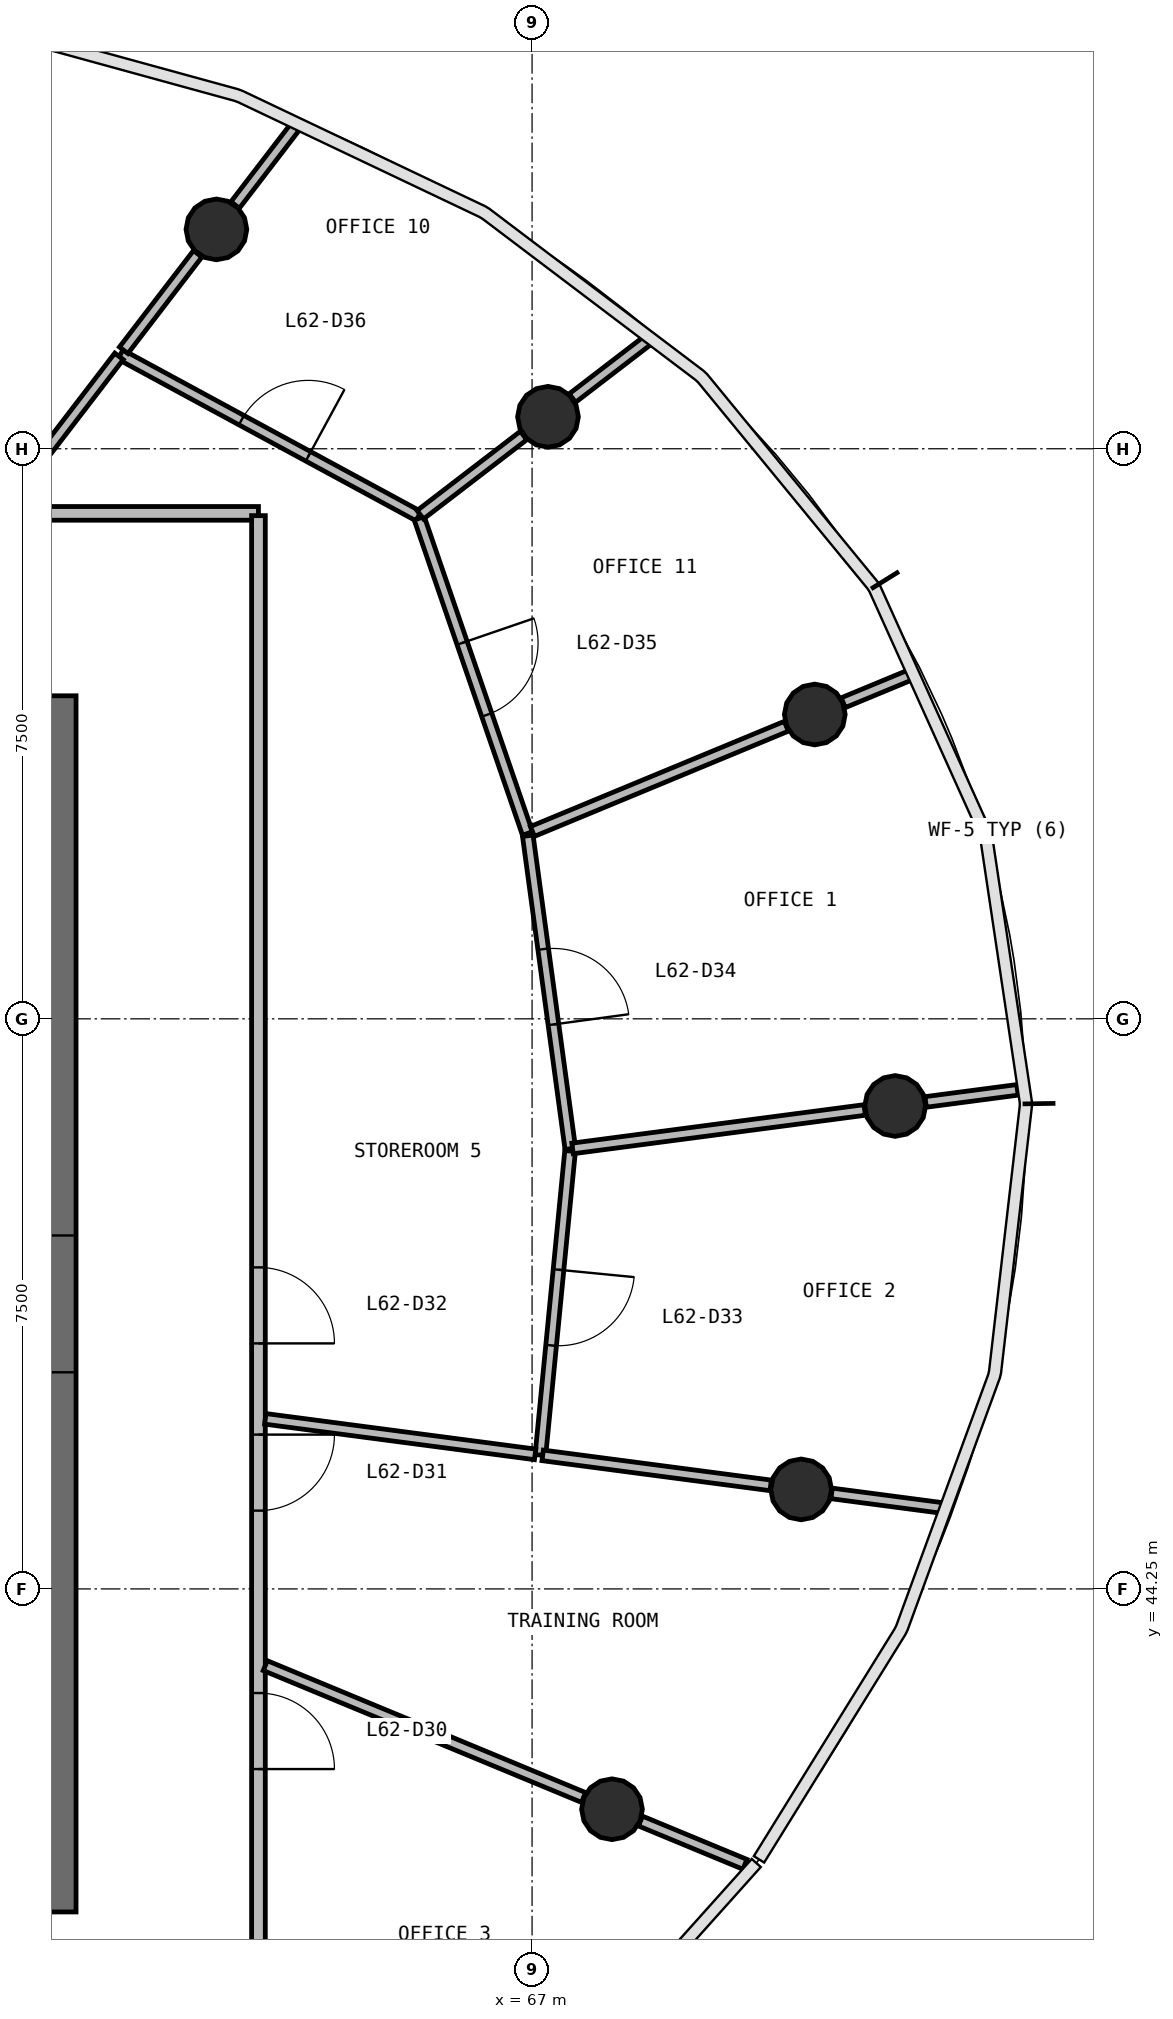
"""IFC4 building model, lengths in metres.
Left out: names, types, materials, properties, quantities, classifications, styles, units other than length and angle.
Written with IfcOpenShell. Run it as: python <this file> out.ifc"""

import sys

from ifc_helpers import new_model, si_unit, direction, frame, frame_2d, origin, origin_2d, place, context, subcontext, project, spatial, rectangle, circle, extrude, source, transform, mapped, element, fill, save


model = new_model("IFC4")
c1 = context("Model", 3, precision=1e-05, world=origin(), true_north=direction((0.0, 1.0)))
c2 = subcontext(c1, "Body", "Model", "MODEL_VIEW")
j1 = project(units=[si_unit("LENGTHUNIT", "METRE"), si_unit("PLANEANGLEUNIT", "RADIAN")], contexts=[c1])
p1 = place(None, origin())
s1 = spatial("IfcSite", under=j1, at=p1, CompositionType="ELEMENT")
p2 = place(p1, origin())
s2 = spatial("IfcBuilding", under=s1, at=p2, CompositionType="ELEMENT")
p3 = place(p2, frame((0.0, 0.0, 254.0)))
s3 = spatial("IfcBuildingStorey", under=s2, at=p3, CompositionType="ELEMENT", Elevation=254.0)
p4 = place(p3, frame((60.7, 40.0, 0.0), z_axis=(0.0, 0.0, 1.0), x_axis=(0.0, 1.0, 0.0)))
e1 = element("IfcWall", 1, at=p4, inside=s3, PredefinedType="SHEAR", context=c2, shape_type="SweptSolid", body=[
    extrude(rectangle(XDim=16.0, YDim=0.6, at=frame_2d((8.0, 0.0))), origin(), (0.0, 0.0, 1.0), 3.9),
])
p5 = place(p4, frame((7.1, 0.0, 0.0)))
e2 = element("IfcOpeningElement", 2, at=p5, cuts=e1, PredefinedType="OPENING", context=c2, shape_type="SweptSolid", body=[
    extrude(rectangle(XDim=1.8, YDim=2.1, at=frame_2d((0.9, 1.05))), frame((0.0, 0.31, 0.0), z_axis=(0.0, -1.0, 0.0), x_axis=(1.0, 0.0, 0.0)), (0.0, 0.0, 1.0), 0.62),
])
m1 = source(origin(), c2, "Body", "SweptSolid", [
    extrude(circle(Radius=0.4, at=origin_2d()), origin(), (0.0, 0.0, 1.0), 3.9),
])
for number, where, z_axis, x_axis in (
    (3, (71.777, 50.604, 0.0), (0.0, 0.0, 1.0), (1.0, 0.0, 0.0)),
    (4, (70.719, 55.754, 0.0), (0.0, 0.0, 1.0), (1.0, 0.0, 0.0)),
    (5, (67.209, 59.671, 0.0), (0.0, 0.0, 1.0), (1.0, 0.0, 0.0)),
    (6, (62.847, 62.136, 0.0), (0.0, 0.0, 1.0), (1.0, 0.0, 0.0)),
    (7, (68.052, 41.351, 0.0), (0.0, 0.0, 1.0), (1.0, 0.0, 0.0)),
    (8, (70.54, 45.559, 0.0), (0.0, 0.0, 1.0), (1.0, 0.0, 0.0)),
):
    element("IfcColumn", number, at=place(p3, frame(where, z_axis=z_axis, x_axis=x_axis)), inside=s3, PredefinedType="COLUMN", context=c2, shape_type="MappedRepresentation", body=[
        mapped(m1, transform((0.0, 0.0, 0.0), scale=1.0)),
    ])
p6 = place(p3, frame((40.6, 58.4, 0.0), z_axis=(0.0, 0.0, 1.0), x_axis=(1.0, 0.0, 0.0)))
e9 = element("IfcWall", 9, at=p6, inside=s3, PredefinedType="PARTITIONING", context=c2, shape_type="SweptSolid", body=[
    extrude(rectangle(XDim=22.8, YDim=0.18, at=frame_2d((11.4, 0.0))), origin(), (0.0, 0.0, 1.0), 2.88),
])
p7 = place(p6, frame((16.15, 0.0, 0.0)))
e10 = element("IfcOpeningElement", 10, at=p7, cuts=e9, PredefinedType="OPENING", context=c2, shape_type="SweptSolid", body=[
    extrude(rectangle(XDim=1.0, YDim=2.1, at=frame_2d((0.5, 1.05))), frame((0.0, 0.1, 0.0), z_axis=(0.0, -1.0, 0.0), x_axis=(1.0, 0.0, 0.0)), (0.0, 0.0, 1.0), 0.2),
])
p8 = place(p6, frame((10.95, 0.0, 0.0)))
e11 = element("IfcOpeningElement", 11, at=p8, cuts=e9, PredefinedType="OPENING", context=c2, shape_type="SweptSolid", body=[
    extrude(rectangle(XDim=1.0, YDim=2.1, at=frame_2d((0.5, 1.05))), frame((0.0, 0.1, 0.0), z_axis=(0.0, -1.0, 0.0), x_axis=(1.0, 0.0, 0.0)), (0.0, 0.0, 1.0), 0.2),
])
p9 = place(p6, frame((8.75, 0.0, 0.0)))
e12 = element("IfcOpeningElement", 12, at=p9, cuts=e9, PredefinedType="OPENING", context=c2, shape_type="SweptSolid", body=[
    extrude(rectangle(XDim=1.0, YDim=2.1, at=frame_2d((0.5, 1.05))), frame((0.0, 0.1, 0.0), z_axis=(0.0, -1.0, 0.0), x_axis=(1.0, 0.0, 0.0)), (0.0, 0.0, 1.0), 0.2),
])
p10 = place(p6, frame((5.75, 0.0, 0.0)))
e13 = element("IfcOpeningElement", 13, at=p10, cuts=e9, PredefinedType="OPENING", context=c2, shape_type="SweptSolid", body=[
    extrude(rectangle(XDim=1.0, YDim=2.1, at=frame_2d((0.5, 1.05))), frame((0.0, 0.1, 0.0), z_axis=(0.0, -1.0, 0.0), x_axis=(1.0, 0.0, 0.0)), (0.0, 0.0, 1.0), 0.2),
])
p11 = place(p3, frame((63.4, 58.37, 0.0), z_axis=(0.0, 0.0, 1.0), x_axis=(0.0, -1.0, 0.0)))
e14 = element("IfcWall", 14, at=p11, inside=s3, PredefinedType="PARTITIONING", context=c2, shape_type="SweptSolid", body=[
    extrude(rectangle(XDim=20.74, YDim=0.18, at=frame_2d((10.37, 0.0))), origin(), (0.0, 0.0, 1.0), 2.88),
])
p12 = place(p11, frame((15.49, 0.0, 0.0)))
e15 = element("IfcOpeningElement", 15, at=p12, cuts=e14, PredefinedType="OPENING", context=c2, shape_type="SweptSolid", body=[
    extrude(rectangle(XDim=1.0, YDim=2.1, at=frame_2d((0.5, 1.05))), frame((0.0, 0.1, 0.0), z_axis=(0.0, -1.0, 0.0), x_axis=(1.0, 0.0, 0.0)), (0.0, 0.0, 1.0), 0.2),
])
p13 = place(p11, frame((12.09, 0.0, 0.0)))
e16 = element("IfcOpeningElement", 16, at=p13, cuts=e14, PredefinedType="OPENING", context=c2, shape_type="SweptSolid", body=[
    extrude(rectangle(XDim=1.0, YDim=2.1, at=frame_2d((0.5, 1.05))), frame((0.0, 0.1, 0.0), z_axis=(0.0, -1.0, 0.0), x_axis=(1.0, 0.0, 0.0)), (0.0, 0.0, 1.0), 0.2),
])
p14 = place(p11, frame((9.89, 0.0, 0.0)))
e17 = element("IfcOpeningElement", 17, at=p14, cuts=e14, PredefinedType="OPENING", context=c2, shape_type="SweptSolid", body=[
    extrude(rectangle(XDim=1.0, YDim=2.1, at=frame_2d((0.5, 1.05))), frame((0.0, 0.1, 0.0), z_axis=(0.0, -1.0, 0.0), x_axis=(1.0, 0.0, 0.0)), (0.0, 0.0, 1.0), 0.2),
])
p15 = place(p3, frame((63.49, 43.241, 0.0), z_axis=(0.0, 0.0, 1.0), x_axis=(0.923863854318, -0.382721280679, 0.0)))
e18 = element("IfcWall", 18, at=p15, inside=s3, PredefinedType="PARTITIONING", context=c2, shape_type="SweptSolid", body=[
    extrude(rectangle(XDim=4.532, YDim=0.14, at=frame_2d((2.266, 0.0))), origin(), (0.0, 0.0, 1.0), 2.88),
])
p16 = place(p3, frame((61.584, 60.49, 0.0), z_axis=(0.0, 0.0, 1.0), x_axis=(0.879105698322, -0.476626867873, 0.0)))
e19 = element("IfcWall", 19, at=p16, inside=s3, PredefinedType="PARTITIONING", context=c2, shape_type="SweptSolid", body=[
    extrude(rectangle(XDim=4.461, YDim=0.14, at=frame_2d((2.231, 0.0))), origin(), (0.0, 0.0, 1.0), 2.88),
])
p17 = place(p16, frame((1.812, 0.0, 0.0)))
e20 = element("IfcOpeningElement", 20, at=p17, cuts=e19, PredefinedType="OPENING", context=c2, shape_type="SweptSolid", body=[
    extrude(rectangle(XDim=1.0, YDim=2.1, at=frame_2d((0.5, 1.05))), frame((0.0, 0.08, 0.0), z_axis=(0.0, -1.0, 0.0), x_axis=(1.0, 0.0, 0.0)), (0.0, 0.0, 1.0), 0.16),
])
p18 = place(p3, frame((65.516, 58.335, 0.0), z_axis=(0.0, 0.0, 1.0), x_axis=(0.324784086982, -0.94578818815, 0.0)))
e21 = element("IfcWall", 21, at=p18, inside=s3, PredefinedType="PARTITIONING", context=c2, shape_type="SweptSolid", body=[
    extrude(rectangle(XDim=4.385, YDim=0.14, at=frame_2d((2.192, 0.0))), origin(), (0.0, 0.0, 1.0), 2.88),
])
p19 = place(p18, frame((1.735, 0.0, 0.0)))
e22 = element("IfcOpeningElement", 22, at=p19, cuts=e21, PredefinedType="OPENING", context=c2, shape_type="SweptSolid", body=[
    extrude(rectangle(XDim=1.0, YDim=2.1, at=frame_2d((0.5, 1.05))), frame((0.0, 0.08, 0.0), z_axis=(0.0, -1.0, 0.0), x_axis=(1.0, 0.0, 0.0)), (0.0, 0.0, 1.0), 0.16),
])
p20 = place(p3, frame((66.944, 54.158, 0.0), z_axis=(0.0, 0.0, 1.0), x_axis=(0.134607157265, -0.990899042896, 0.0)))
e23 = element("IfcWall", 23, at=p20, inside=s3, PredefinedType="PARTITIONING", context=c2, shape_type="SweptSolid", body=[
    extrude(rectangle(XDim=4.155, YDim=0.14, at=frame_2d((2.078, 0.0))), origin(), (0.0, 0.0, 1.0), 2.88),
])
p21 = place(p20, frame((1.505, 0.0, 0.0)))
e24 = element("IfcOpeningElement", 24, at=p21, cuts=e23, PredefinedType="OPENING", context=c2, shape_type="SweptSolid", body=[
    extrude(rectangle(XDim=1.0, YDim=2.1, at=frame_2d((0.5, 1.05))), frame((0.0, 0.08, 0.0), z_axis=(0.0, -1.0, 0.0), x_axis=(1.0, 0.0, 0.0)), (0.0, 0.0, 1.0), 0.16),
])
p22 = place(p3, frame((67.5, 50.011, 0.0), z_axis=(0.0, 0.0, 1.0), x_axis=(-0.097182142136, -0.995266613149, 0.0)))
e25 = element("IfcWall", 25, at=p22, inside=s3, PredefinedType="PARTITIONING", context=c2, shape_type="SweptSolid", body=[
    extrude(rectangle(XDim=4.02, YDim=0.14, at=frame_2d((2.01, 0.0))), origin(), (0.0, 0.0, 1.0), 2.88),
])
p23 = place(p22, frame((1.57, 0.0, 0.0)))
e26 = element("IfcOpeningElement", 26, at=p23, cuts=e25, PredefinedType="OPENING", context=c2, shape_type="SweptSolid", body=[
    extrude(rectangle(XDim=1.0, YDim=2.1, at=frame_2d((0.5, 1.05))), frame((0.0, 0.08, 0.0), z_axis=(0.0, -1.0, 0.0), x_axis=(1.0, 0.0, 0.0)), (0.0, 0.0, 1.0), 0.16),
])
p24 = place(p3, frame((67.533, 50.045, 0.0), z_axis=(0.0, 0.0, 1.0), x_axis=(0.991448721088, 0.130496871433, 0.0)))
e27 = element("IfcWall", 27, at=p24, inside=s3, PredefinedType="PARTITIONING", context=c2, shape_type="SweptSolid", body=[
    extrude(rectangle(XDim=3.876, YDim=0.14, at=frame_2d((1.938, 0.0))), origin(), (0.0, 0.0, 1.0), 2.88),
])
p25 = place(p3, frame((63.49, 46.487, 0.0), z_axis=(0.0, 0.0, 1.0), x_axis=(0.991449189531, -0.130493312389, 0.0)))
e28 = element("IfcWall", 28, at=p25, inside=s3, PredefinedType="PARTITIONING", context=c2, shape_type="SweptSolid", body=[
    extrude(rectangle(XDim=3.581, YDim=0.14, at=frame_2d((1.791, 0.0))), origin(), (0.0, 0.0, 1.0), 2.88),
])
p26 = place(p3, frame((67.005, 54.215, 0.0), z_axis=(0.0, 0.0, 1.0), x_axis=(0.923881881036, 0.382677762475, 0.0)))
e29 = element("IfcWall", 29, at=p26, inside=s3, PredefinedType="PARTITIONING", context=c2, shape_type="SweptSolid", body=[
    extrude(rectangle(XDim=3.616, YDim=0.14, at=frame_2d((1.808, 0.0))), origin(), (0.0, 0.0, 1.0), 2.88),
])
p27 = place(p3, frame((67.139, 46.007, 0.0), z_axis=(0.0, 0.0, 1.0), x_axis=(0.991449900288, -0.130487912157, 0.0)))
e30 = element("IfcWall", 30, at=p27, inside=s3, PredefinedType="PARTITIONING", context=c2, shape_type="SweptSolid", body=[
    extrude(rectangle(XDim=3.025, YDim=0.14, at=frame_2d((1.513, 0.0))), origin(), (0.0, 0.0, 1.0), 2.88),
])
p28 = place(p3, frame((60.049, 58.49, 0.0), z_axis=(0.0, 0.0, 1.0), x_axis=(0.608762828767, 0.793352266217, 0.0)))
e31 = element("IfcWall", 31, at=p28, inside=s3, PredefinedType="PARTITIONING", context=c2, shape_type="SweptSolid", body=[
    extrude(rectangle(XDim=2.49, YDim=0.14, at=frame_2d((1.245, 0.0))), origin(), (0.0, 0.0, 1.0), 2.88),
])
p29 = place(p3, frame((65.53, 58.382, 0.0), z_axis=(0.0, 0.0, 1.0), x_axis=(0.793349348646, 0.608766630986, 0.0)))
e32 = element("IfcWall", 32, at=p29, inside=s3, PredefinedType="PARTITIONING", context=c2, shape_type="SweptSolid", body=[
    extrude(rectangle(XDim=1.713, YDim=0.14, at=frame_2d((0.856, 0.0))), origin(), (0.0, 0.0, 1.0), 2.88),
])
p30 = place(p3, frame((61.627, 60.546, 0.0), z_axis=(0.0, 0.0, 1.0), x_axis=(0.608803148953, 0.79332132571, 0.0)))
e33 = element("IfcWall", 33, at=p30, inside=s3, PredefinedType="PARTITIONING", context=c2, shape_type="SweptSolid", body=[
    extrude(rectangle(XDim=1.6, YDim=0.14, at=frame_2d((0.8, 0.0))), origin(), (0.0, 0.0, 1.0), 2.88),
])
p31 = place(p3, frame((70.941, 45.506, 0.0), z_axis=(0.0, 0.0, 1.0), x_axis=(0.991445430329, -0.130521870506, 0.0)))
e34 = element("IfcWall", 34, at=p31, inside=s3, PredefinedType="PARTITIONING", context=c2, shape_type="SweptSolid", body=[
    extrude(rectangle(XDim=1.5, YDim=0.14, at=frame_2d((0.75, 0.0))), origin(), (0.0, 0.0, 1.0), 2.88),
])
p32 = place(p3, frame((68.426, 41.196, 0.0), z_axis=(0.0, 0.0, 1.0), x_axis=(0.923870878191, -0.382704325074, 0.0)))
e35 = element("IfcWall", 35, at=p32, inside=s3, PredefinedType="PARTITIONING", context=c2, shape_type="SweptSolid", body=[
    extrude(rectangle(XDim=1.488, YDim=0.14, at=frame_2d((0.744, 0.0))), origin(), (0.0, 0.0, 1.0), 2.88),
])
p33 = place(p3, frame((63.093, 62.457, 0.0), z_axis=(0.0, 0.0, 1.0), x_axis=(0.608700288014, 0.793400251683, 0.0)))
e36 = element("IfcWall", 36, at=p33, inside=s3, PredefinedType="PARTITIONING", context=c2, shape_type="SweptSolid", body=[
    extrude(rectangle(XDim=1.297, YDim=0.14, at=frame_2d((0.648, 0.0))), origin(), (0.0, 0.0, 1.0), 2.88),
])
p34 = place(p3, frame((67.531, 59.917, 0.0), z_axis=(0.0, 0.0, 1.0), x_axis=(0.793361818833, 0.608750379399, 0.0)))
e37 = element("IfcWall", 37, at=p34, inside=s3, PredefinedType="PARTITIONING", context=c2, shape_type="SweptSolid", body=[
    extrude(rectangle(XDim=1.254, YDim=0.14, at=frame_2d((0.627, 0.0))), origin(), (0.0, 0.0, 1.0), 2.88),
])
p35 = place(p3, frame((72.178, 50.656, 0.0), z_axis=(0.0, 0.0, 1.0), x_axis=(0.991448836413, 0.13049599525, 0.0)))
e38 = element("IfcWall", 38, at=p35, inside=s3, PredefinedType="PARTITIONING", context=c2, shape_type="SweptSolid", body=[
    extrude(rectangle(XDim=1.218, YDim=0.14, at=frame_2d((0.609, 0.0))), origin(), (0.0, 0.0, 1.0), 2.88),
])
p36 = place(p3, frame((71.094, 55.909, 0.0), z_axis=(0.0, 0.0, 1.0), x_axis=(0.923864621618, 0.382719428462, 0.0)))
e39 = element("IfcWall", 39, at=p36, inside=s3, PredefinedType="PARTITIONING", context=c2, shape_type="SweptSolid", body=[
    extrude(rectangle(XDim=0.997, YDim=0.14, at=frame_2d((0.499, 0.0))), origin(), (0.0, 0.0, 1.0), 2.88),
])
m2 = source(origin(), c2, "Body", "SweptSolid", [
    extrude(rectangle(XDim=1.8, YDim=2.1, at=frame_2d((0.9, 1.05))), frame((0.0, 0.025, 0.0), z_axis=(0.0, -1.0, 0.0), x_axis=(1.0, 0.0, 0.0)), (0.0, 0.0, 1.0), 0.05),
])
p37 = place(p5, origin())
e40 = element("IfcDoor", 40, at=p37, inside=s3, OperationType="SINGLE_SWING_LEFT", PredefinedType="DOOR", context=c2, shape_type="MappedRepresentation", body=[
    mapped(m2, transform((0.0, 0.0, 0.0), scale=1.0)),
])
fill(e2, e40)
m3 = source(origin(), c2, "Body", "SweptSolid", [
    extrude(rectangle(XDim=1.0, YDim=2.1, at=frame_2d((0.5, 1.05))), frame((0.0, 0.025, 0.0), z_axis=(0.0, -1.0, 0.0), x_axis=(1.0, 0.0, 0.0)), (0.0, 0.0, 1.0), 0.05),
])
p38 = place(p12, origin())
e41 = element("IfcDoor", 41, at=p38, inside=s3, OperationType="SINGLE_SWING_RIGHT", PredefinedType="DOOR", context=c2, shape_type="MappedRepresentation", body=[
    mapped(m3, transform((0.0, 0.0, 0.0), scale=1.0)),
])
fill(e15, e41)
p39 = place(p13, origin())
e42 = element("IfcDoor", 42, at=p39, inside=s3, OperationType="SINGLE_SWING_LEFT", PredefinedType="DOOR", context=c2, shape_type="MappedRepresentation", body=[
    mapped(m3, transform((0.0, 0.0, 0.0), scale=1.0)),
])
fill(e16, e42)
p40 = place(p14, origin())
e43 = element("IfcDoor", 43, at=p40, inside=s3, OperationType="SINGLE_SWING_RIGHT", PredefinedType="DOOR", context=c2, shape_type="MappedRepresentation", body=[
    mapped(m3, transform((0.0, 0.0, 0.0), scale=1.0)),
])
fill(e17, e43)
p41 = place(p23, origin())
e44 = element("IfcDoor", 44, at=p41, inside=s3, OperationType="SINGLE_SWING_LEFT", PredefinedType="DOOR", context=c2, shape_type="MappedRepresentation", body=[
    mapped(m3, transform((0.0, 0.0, 0.0), scale=1.0)),
])
fill(e26, e44)
p42 = place(p21, origin())
e45 = element("IfcDoor", 45, at=p42, inside=s3, OperationType="SINGLE_SWING_RIGHT", PredefinedType="DOOR", context=c2, shape_type="MappedRepresentation", body=[
    mapped(m3, transform((0.0, 0.0, 0.0), scale=1.0)),
])
fill(e24, e45)
p43 = place(p19, origin())
e46 = element("IfcDoor", 46, at=p43, inside=s3, OperationType="SINGLE_SWING_LEFT", PredefinedType="DOOR", context=c2, shape_type="MappedRepresentation", body=[
    mapped(m3, transform((0.0, 0.0, 0.0), scale=1.0)),
])
fill(e22, e46)
p44 = place(p17, origin())
e47 = element("IfcDoor", 47, at=p44, inside=s3, OperationType="SINGLE_SWING_RIGHT", PredefinedType="DOOR", context=c2, shape_type="MappedRepresentation", body=[
    mapped(m3, transform((0.0, 0.0, 0.0), scale=1.0)),
])
fill(e20, e47)
save(model, sys.argv[1])
